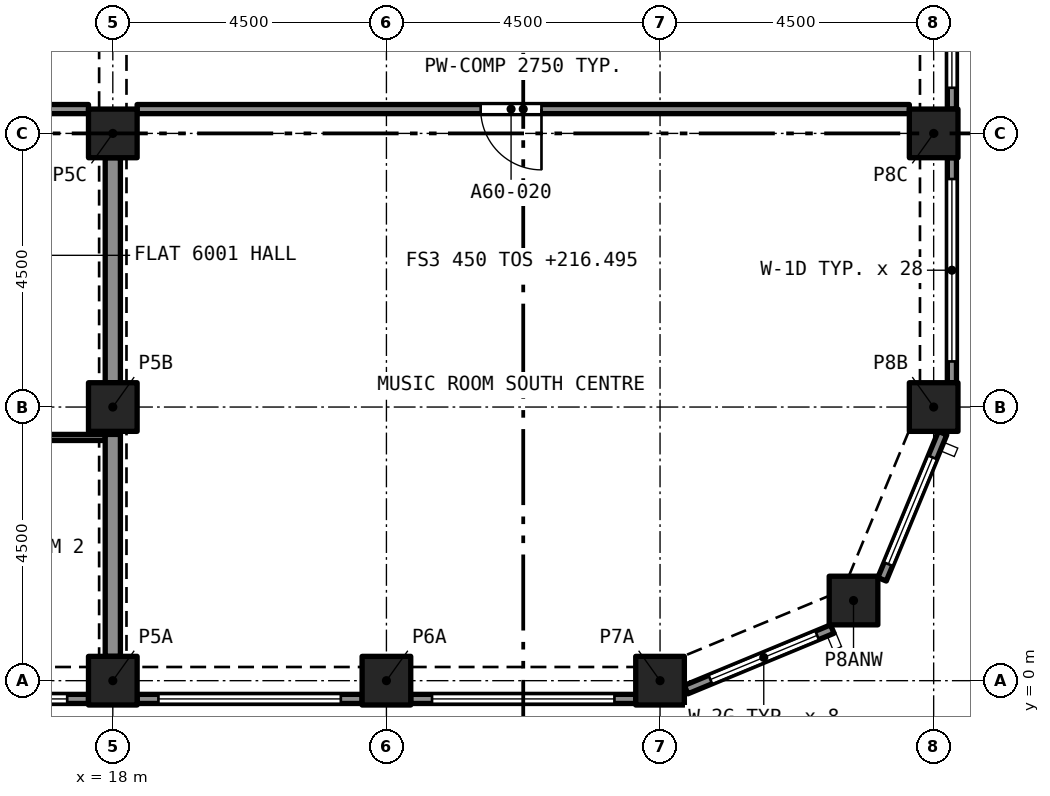
"""IFC4 building model, lengths in metres.
Left out: names, types, materials, properties, quantities, classifications, styles, units other than length and angle.
Written with IfcOpenShell. Run it as: python <this file> out.ifc"""

import sys

from ifc_helpers import new_model, si_unit, direction, frame, frame_2d, origin, origin_2d, place, context, subcontext, project, spatial, rectangle, extrude, element, fill, save


model = new_model("IFC4")
c1 = context("Model", 3, precision=1e-05, world=origin(), true_north=direction((0.0, 1.0)))
c2 = subcontext(c1, "Body", "Model", "MODEL_VIEW")
j1 = project(units=[si_unit("LENGTHUNIT", "METRE"), si_unit("PLANEANGLEUNIT", "RADIAN")], contexts=[c1])
p1 = place(None, origin())
s1 = spatial("IfcSite", under=j1, at=p1, CompositionType="ELEMENT")
p2 = place(p1, origin())
s2 = spatial("IfcBuilding", under=s1, at=p2, CompositionType="ELEMENT")
p3 = place(p2, frame((0.0, 0.0, 216.495)))
s3 = spatial("IfcBuildingStorey", under=s2, at=p3, CompositionType="ELEMENT", Elevation=216.495)
for number, where, z_axis, x_axis in (
    (1, (18.0, 0.0, 0.0), (0.0, 0.0, 1.0), (1.0, 0.0, 0.0)),
    (2, (22.5, 0.0, 0.0), (0.0, 0.0, 1.0), (1.0, 0.0, 0.0)),
    (3, (27.0, 0.0, 0.0), (0.0, 0.0, 1.0), (1.0, 0.0, 0.0)),
    (4, (30.182, 1.318, 0.0), (0.0, 0.0, 1.0), (1.0, 0.0, 0.0)),
    (5, (18.0, 4.5, 0.0), (0.0, 0.0, 1.0), (1.0, 0.0, 0.0)),
    (6, (31.5, 4.5, 0.0), (0.0, 0.0, 1.0), (1.0, 0.0, 0.0)),
    (7, (18.0, 9.0, 0.0), (0.0, 0.0, 1.0), (1.0, 0.0, 0.0)),
    (8, (31.5, 9.0, 0.0), (0.0, 0.0, 1.0), (1.0, 0.0, 0.0)),
):
    element("IfcColumn", number, at=place(p3, frame(where, z_axis=z_axis, x_axis=x_axis)), inside=s3, PredefinedType="COLUMN", context=c2, shape_type="SweptSolid", body=[
        extrude(rectangle(XDim=0.8, YDim=0.8, at=origin_2d()), origin(), (0.0, 0.0, 1.0), 3.2),
    ])
p4 = place(p3, frame((29.833, 0.849, 0.0), z_axis=(0.0, 0.0, 1.0), x_axis=(-0.923885342263, -0.382669406082, 0.0)))
e9 = element("IfcWall", 9, at=p4, inside=s3, PredefinedType="SOLIDWALL", context=c2, shape_type="SweptSolid", body=[
    extrude(rectangle(XDim=2.602, YDim=0.15, at=frame_2d((1.301, 0.0))), origin(), (0.0, 0.0, 1.0), 3.2),
])
p5 = place(p4, frame((0.27, 0.0, 0.45)))
e10 = element("IfcOpeningElement", 10, at=p5, cuts=e9, PredefinedType="OPENING", context=c2, shape_type="SweptSolid", body=[
    extrude(rectangle(XDim=1.9, YDim=1.95, at=frame_2d((0.95, 0.975))), frame((0.0, 0.085, 0.0), z_axis=(0.0, -1.0, 0.0), x_axis=(1.0, 0.0, 0.0)), (0.0, 0.0, 1.0), 0.17),
])
p6 = place(p3, frame((31.647, 4.071, 0.0), z_axis=(0.0, 0.0, 1.0), x_axis=(-0.382669406082, -0.923885342263, 0.0)))
e11 = element("IfcWall", 11, at=p6, inside=s3, PredefinedType="SOLIDWALL", context=c2, shape_type="SweptSolid", body=[
    extrude(rectangle(XDim=2.602, YDim=0.15, at=frame_2d((1.301, 0.0))), origin(), (0.0, 0.0, 1.0), 3.2),
])
p7 = place(p6, frame((0.432, 0.0, 0.45)))
e12 = element("IfcOpeningElement", 12, at=p7, cuts=e11, PredefinedType="OPENING", context=c2, shape_type="SweptSolid", body=[
    extrude(rectangle(XDim=1.9, YDim=1.95, at=frame_2d((0.95, 0.975))), frame((0.0, 0.085, 0.0), z_axis=(0.0, -1.0, 0.0), x_axis=(1.0, 0.0, 0.0)), (0.0, 0.0, 1.0), 0.17),
])
p8 = place(p3, frame((31.8, 8.6, 0.0), z_axis=(0.0, 0.0, 1.0), x_axis=(0.0, -1.0, 0.0)))
e13 = element("IfcWall", 13, at=p8, inside=s3, PredefinedType="SOLIDWALL", context=c2, shape_type="SweptSolid", body=[
    extrude(rectangle(XDim=3.7, YDim=0.15, at=frame_2d((1.85, 0.0))), origin(), (0.0, 0.0, 1.0), 3.2),
])
p9 = place(p8, frame((0.35, 0.0, 0.45)))
e14 = element("IfcOpeningElement", 14, at=p9, cuts=e13, PredefinedType="OPENING", context=c2, shape_type="SweptSolid", body=[
    extrude(rectangle(XDim=3.0, YDim=1.95, at=frame_2d((1.5, 0.975))), frame((0.0, 0.085, 0.0), z_axis=(0.0, -1.0, 0.0), x_axis=(1.0, 0.0, 0.0)), (0.0, 0.0, 1.0), 0.17),
])
p10 = place(p3, frame((31.8, 13.1, 0.0), z_axis=(0.0, 0.0, 1.0), x_axis=(0.0, -1.0, 0.0)))
e15 = element("IfcWall", 15, at=p10, inside=s3, PredefinedType="SOLIDWALL", context=c2, shape_type="SweptSolid", body=[
    extrude(rectangle(XDim=3.7, YDim=0.15, at=frame_2d((1.85, 0.0))), origin(), (0.0, 0.0, 1.0), 3.2),
])
p11 = place(p10, frame((0.35, 0.0, 0.45)))
e16 = element("IfcOpeningElement", 16, at=p11, cuts=e15, PredefinedType="OPENING", context=c2, shape_type="SweptSolid", body=[
    extrude(rectangle(XDim=3.0, YDim=1.95, at=frame_2d((1.5, 0.975))), frame((0.0, 0.085, 0.0), z_axis=(0.0, -1.0, 0.0), x_axis=(1.0, 0.0, 0.0)), (0.0, 0.0, 1.0), 0.17),
])
p12 = place(p3, frame((17.6, -0.3, 0.0), z_axis=(0.0, 0.0, 1.0), x_axis=(-1.0, 0.0, 0.0)))
e17 = element("IfcWall", 17, at=p12, inside=s3, PredefinedType="SOLIDWALL", context=c2, shape_type="SweptSolid", body=[
    extrude(rectangle(XDim=3.7, YDim=0.15, at=frame_2d((1.85, 0.0))), origin(), (0.0, 0.0, 1.0), 3.2),
])
p13 = place(p12, frame((0.35, 0.0, 0.45)))
e18 = element("IfcOpeningElement", 18, at=p13, cuts=e17, PredefinedType="OPENING", context=c2, shape_type="SweptSolid", body=[
    extrude(rectangle(XDim=3.0, YDim=1.95, at=frame_2d((1.5, 0.975))), frame((0.0, 0.085, 0.0), z_axis=(0.0, -1.0, 0.0), x_axis=(1.0, 0.0, 0.0)), (0.0, 0.0, 1.0), 0.17),
])
p14 = place(p3, frame((22.1, -0.3, 0.0), z_axis=(0.0, 0.0, 1.0), x_axis=(-1.0, 0.0, 0.0)))
e19 = element("IfcWall", 19, at=p14, inside=s3, PredefinedType="SOLIDWALL", context=c2, shape_type="SweptSolid", body=[
    extrude(rectangle(XDim=3.7, YDim=0.15, at=frame_2d((1.85, 0.0))), origin(), (0.0, 0.0, 1.0), 3.2),
])
p15 = place(p14, frame((0.35, 0.0, 0.45)))
e20 = element("IfcOpeningElement", 20, at=p15, cuts=e19, PredefinedType="OPENING", context=c2, shape_type="SweptSolid", body=[
    extrude(rectangle(XDim=3.0, YDim=1.95, at=frame_2d((1.5, 0.975))), frame((0.0, 0.085, 0.0), z_axis=(0.0, -1.0, 0.0), x_axis=(1.0, 0.0, 0.0)), (0.0, 0.0, 1.0), 0.17),
])
p16 = place(p3, frame((26.6, -0.3, 0.0), z_axis=(0.0, 0.0, 1.0), x_axis=(-1.0, 0.0, 0.0)))
e21 = element("IfcWall", 21, at=p16, inside=s3, PredefinedType="SOLIDWALL", context=c2, shape_type="SweptSolid", body=[
    extrude(rectangle(XDim=3.7, YDim=0.15, at=frame_2d((1.85, 0.0))), origin(), (0.0, 0.0, 1.0), 3.2),
])
p17 = place(p16, frame((0.35, 0.0, 0.45)))
e22 = element("IfcOpeningElement", 22, at=p17, cuts=e21, PredefinedType="OPENING", context=c2, shape_type="SweptSolid", body=[
    extrude(rectangle(XDim=3.0, YDim=1.95, at=frame_2d((1.5, 0.975))), frame((0.0, 0.085, 0.0), z_axis=(0.0, -1.0, 0.0), x_axis=(1.0, 0.0, 0.0)), (0.0, 0.0, 1.0), 0.17),
])
p18 = place(p3, frame((17.875, 4.0, 0.0), z_axis=(0.0, 0.0, 1.0), x_axis=(-1.0, 0.0, 0.0)))
e23 = element("IfcWall", 23, at=p18, inside=s3, PredefinedType="PARTITIONING", context=c2, shape_type="SweptSolid", body=[
    extrude(rectangle(XDim=4.375, YDim=0.1, at=frame_2d((2.188, 0.0))), origin(), (0.0, 0.0, 1.0), 2.9),
])
p19 = place(p18, frame((1.675, 0.0, 0.0)))
e24 = element("IfcOpeningElement", 24, at=p19, cuts=e23, PredefinedType="OPENING", context=c2, shape_type="SweptSolid", body=[
    extrude(rectangle(XDim=0.9, YDim=2.1, at=frame_2d((0.45, 1.05))), frame((0.0, 0.06, 0.0), z_axis=(0.0, -1.0, 0.0), x_axis=(1.0, 0.0, 0.0)), (0.0, 0.0, 1.0), 0.12),
])
p20 = place(p3, frame((18.0, 0.4, 0.0), z_axis=(0.0, 0.0, 1.0), x_axis=(0.0, 1.0, 0.0)))
e25 = element("IfcWall", 25, at=p20, inside=s3, PredefinedType="PARTITIONING", context=c2, shape_type="SweptSolid", body=[
    extrude(rectangle(XDim=3.65, YDim=0.25, at=frame_2d((1.825, 0.0))), origin(), (0.0, 0.0, 1.0), 2.38),
])
p21 = place(p3, frame((18.0, 4.9, 0.0), z_axis=(0.0, 0.0, 1.0), x_axis=(0.0, 1.0, 0.0)))
e26 = element("IfcWall", 26, at=p21, inside=s3, PredefinedType="PARTITIONING", context=c2, shape_type="SweptSolid", body=[
    extrude(rectangle(XDim=3.7, YDim=0.25, at=frame_2d((1.85, 0.0))), origin(), (0.0, 0.0, 1.0), 2.38),
])
p22 = place(p3, frame((17.6, 9.4, 0.0), z_axis=(0.0, 0.0, 1.0), x_axis=(-1.0, 0.0, 0.0)))
e27 = element("IfcWall", 27, at=p22, inside=s3, PredefinedType="PARTITIONING", context=c2, shape_type="SweptSolid", body=[
    extrude(rectangle(XDim=2.65, YDim=0.15, at=frame_2d((1.325, 0.0))), origin(), (0.0, 0.0, 1.0), 2.9),
])
p23 = place(p22, frame((1.25, 0.0, 0.0)))
e28 = element("IfcOpeningElement", 28, at=p23, cuts=e27, PredefinedType="OPENING", context=c2, shape_type="SweptSolid", body=[
    extrude(rectangle(XDim=1.2, YDim=2.4, at=frame_2d((0.6, 1.2))), frame((0.0, 0.085, 0.0), z_axis=(0.0, -1.0, 0.0), x_axis=(1.0, 0.0, 0.0)), (0.0, 0.0, 1.0), 0.17),
])
p24 = place(p3, frame((31.1, 9.4, 0.0), z_axis=(0.0, 0.0, 1.0), x_axis=(-1.0, 0.0, 0.0)))
e29 = element("IfcWall", 29, at=p24, inside=s3, PredefinedType="PARTITIONING", context=c2, shape_type="SweptSolid", body=[
    extrude(rectangle(XDim=12.7, YDim=0.15, at=frame_2d((6.35, 0.0))), origin(), (0.0, 0.0, 1.0), 2.75),
])
p25 = place(p24, frame((6.05, 0.0, 0.0)))
e30 = element("IfcOpeningElement", 30, at=p25, cuts=e29, PredefinedType="OPENING", context=c2, shape_type="SweptSolid", body=[
    extrude(rectangle(XDim=1.0, YDim=2.1, at=frame_2d((0.5, 1.05))), frame((0.0, 0.085, 0.0), z_axis=(0.0, -1.0, 0.0), x_axis=(1.0, 0.0, 0.0)), (0.0, 0.0, 1.0), 0.17),
])
p26 = place(p5, origin())
e31 = element("IfcWindow", 31, at=p26, inside=s3, PartitioningType="SINGLE_PANEL", PredefinedType="WINDOW", context=c2, shape_type="SweptSolid", body=[
    extrude(rectangle(XDim=1.9, YDim=1.95, at=frame_2d((0.95, 0.975))), frame((0.0, 0.03, 0.0), z_axis=(0.0, -1.0, 0.0), x_axis=(1.0, 0.0, 0.0)), (0.0, 0.0, 1.0), 0.06),
])
fill(e10, e31)
p27 = place(p7, origin())
e32 = element("IfcWindow", 32, at=p27, inside=s3, PartitioningType="SINGLE_PANEL", PredefinedType="WINDOW", context=c2, shape_type="SweptSolid", body=[
    extrude(rectangle(XDim=1.9, YDim=1.95, at=frame_2d((0.95, 0.975))), frame((0.0, 0.03, 0.0), z_axis=(0.0, -1.0, 0.0), x_axis=(1.0, 0.0, 0.0)), (0.0, 0.0, 1.0), 0.06),
])
fill(e12, e32)
p28 = place(p9, origin())
e33 = element("IfcWindow", 33, at=p28, inside=s3, PartitioningType="SINGLE_PANEL", PredefinedType="WINDOW", context=c2, shape_type="SweptSolid", body=[
    extrude(rectangle(XDim=3.0, YDim=1.95, at=frame_2d((1.5, 0.975))), frame((0.0, 0.03, 0.0), z_axis=(0.0, -1.0, 0.0), x_axis=(1.0, 0.0, 0.0)), (0.0, 0.0, 1.0), 0.06),
])
fill(e14, e33)
p29 = place(p11, origin())
e34 = element("IfcWindow", 34, at=p29, inside=s3, PartitioningType="SINGLE_PANEL", PredefinedType="WINDOW", context=c2, shape_type="SweptSolid", body=[
    extrude(rectangle(XDim=3.0, YDim=1.95, at=frame_2d((1.5, 0.975))), frame((0.0, 0.03, 0.0), z_axis=(0.0, -1.0, 0.0), x_axis=(1.0, 0.0, 0.0)), (0.0, 0.0, 1.0), 0.06),
])
fill(e16, e34)
p30 = place(p13, origin())
e35 = element("IfcWindow", 35, at=p30, inside=s3, PartitioningType="SINGLE_PANEL", PredefinedType="WINDOW", context=c2, shape_type="SweptSolid", body=[
    extrude(rectangle(XDim=3.0, YDim=1.95, at=frame_2d((1.5, 0.975))), frame((0.0, 0.03, 0.0), z_axis=(0.0, -1.0, 0.0), x_axis=(1.0, 0.0, 0.0)), (0.0, 0.0, 1.0), 0.06),
])
fill(e18, e35)
p31 = place(p15, origin())
e36 = element("IfcWindow", 36, at=p31, inside=s3, PartitioningType="SINGLE_PANEL", PredefinedType="WINDOW", context=c2, shape_type="SweptSolid", body=[
    extrude(rectangle(XDim=3.0, YDim=1.95, at=frame_2d((1.5, 0.975))), frame((0.0, 0.03, 0.0), z_axis=(0.0, -1.0, 0.0), x_axis=(1.0, 0.0, 0.0)), (0.0, 0.0, 1.0), 0.06),
])
fill(e20, e36)
p32 = place(p17, origin())
e37 = element("IfcWindow", 37, at=p32, inside=s3, PartitioningType="SINGLE_PANEL", PredefinedType="WINDOW", context=c2, shape_type="SweptSolid", body=[
    extrude(rectangle(XDim=3.0, YDim=1.95, at=frame_2d((1.5, 0.975))), frame((0.0, 0.03, 0.0), z_axis=(0.0, -1.0, 0.0), x_axis=(1.0, 0.0, 0.0)), (0.0, 0.0, 1.0), 0.06),
])
fill(e22, e37)
p33 = place(p25, origin())
e38 = element("IfcDoor", 38, at=p33, inside=s3, OperationType="SINGLE_SWING_RIGHT", PredefinedType="DOOR", context=c2, shape_type="SweptSolid", body=[
    extrude(rectangle(XDim=1.0, YDim=2.1, at=frame_2d((0.5, 1.05))), frame((0.0, 0.025, 0.0), z_axis=(0.0, -1.0, 0.0), x_axis=(1.0, 0.0, 0.0)), (0.0, 0.0, 1.0), 0.05),
])
fill(e30, e38)
save(model, sys.argv[1])
